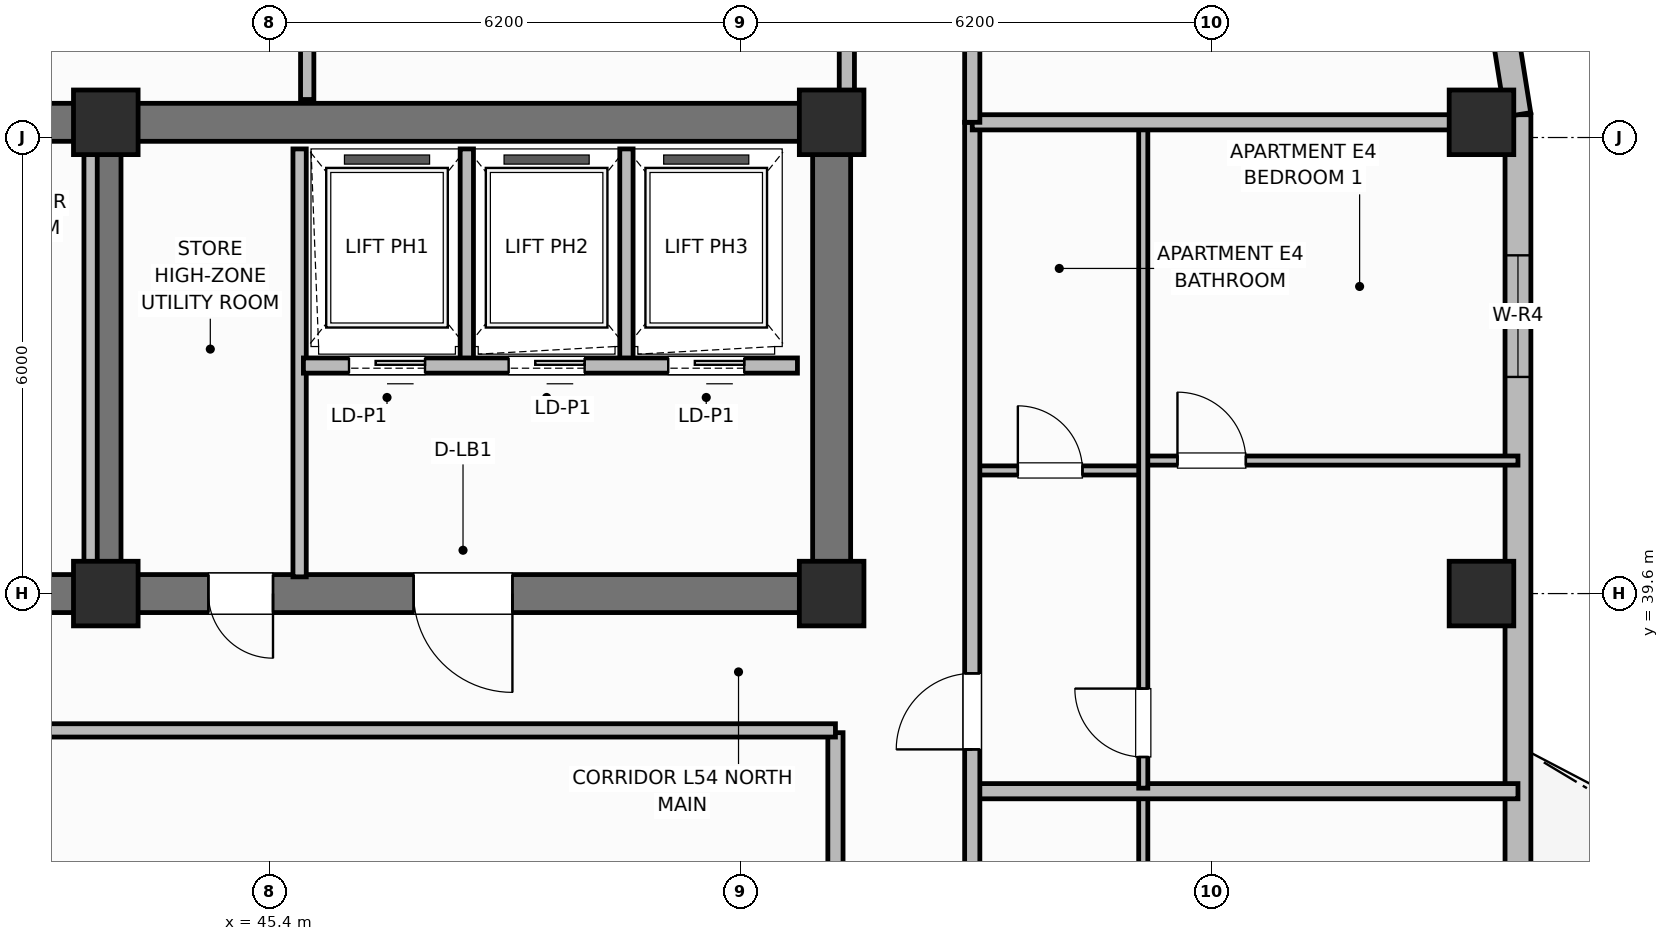
"""IFC4 building model, lengths in metres.
Left out: names, types, materials, properties, quantities, classifications, styles, units other than length and angle.
Written with IfcOpenShell. Run it as: python <this file> out.ifc"""

import sys

from ifc_helpers import new_model, si_unit, direction, frame, frame_2d, origin, origin_2d, place, context, subcontext, project, spatial, rectangle, extrude, element, fill, save


model = new_model("IFC4")
c1 = context("Model", 3, precision=1e-05, world=origin(), true_north=direction((0.0, 1.0)))
c2 = subcontext(c1, "Body", "Model", "MODEL_VIEW")
j1 = project(units=[si_unit("LENGTHUNIT", "METRE"), si_unit("PLANEANGLEUNIT", "RADIAN")], contexts=[c1])
p1 = place(None, origin())
s1 = spatial("IfcSite", under=j1, at=p1, CompositionType="ELEMENT")
p2 = place(p1, origin())
s2 = spatial("IfcBuilding", under=s1, at=p2, CompositionType="ELEMENT")
p3 = place(p2, frame((0.0, 0.0, 218.4)))
s3 = spatial("IfcBuildingStorey", under=s2, at=p3, CompositionType="ELEMENT", Elevation=218.4)
p4 = place(p3, frame((25.6, 45.8, 0.0), z_axis=(0.0, 0.0, 1.0), x_axis=(1.0, 0.0, 0.0)))
e1 = element("IfcWall", 1, at=p4, inside=s3, PredefinedType="SHEAR", context=c2, shape_type="SweptSolid", body=[
    extrude(rectangle(XDim=27.2, YDim=0.5, at=frame_2d((13.6, 0.0))), origin(), (0.0, 0.0, 1.0), 3.7),
])
p5 = place(p3, frame((52.8, 39.85, 0.0), z_axis=(0.0, 0.0, 1.0), x_axis=(0.0, 1.0, 0.0)))
e2 = element("IfcWall", 2, at=p5, inside=s3, PredefinedType="SHEAR", context=c2, shape_type="SweptSolid", body=[
    extrude(rectangle(XDim=5.7, YDim=0.5, at=frame_2d((2.85, 0.0))), origin(), (0.0, 0.0, 1.0), 3.7),
])
p6 = place(p3, frame((52.8, 39.6, 0.0), z_axis=(0.0, 0.0, 1.0), x_axis=(-1.0, 0.0, 0.0)))
e3 = element("IfcWall", 3, at=p6, inside=s3, PredefinedType="SHEAR", context=c2, shape_type="SweptSolid", body=[
    extrude(rectangle(XDim=27.2, YDim=0.5, at=frame_2d((13.6, 0.0))), origin(), (0.0, 0.0, 1.0), 3.7),
])
p7 = place(p6, frame((24.3, 0.0, 0.0)))
e4 = element("IfcOpeningElement", 4, at=p7, cuts=e3, PredefinedType="OPENING", context=c2, shape_type="SweptSolid", body=[
    extrude(rectangle(XDim=1.1, YDim=2.15, at=frame_2d((0.55, 1.075))), frame((0.0, 0.26, 0.0), z_axis=(0.0, -1.0, 0.0), x_axis=(1.0, 0.0, 0.0)), (0.0, 0.0, 1.0), 0.52),
])
p8 = place(p6, frame((21.85, 0.0, 0.0)))
e5 = element("IfcOpeningElement", 5, at=p8, cuts=e3, PredefinedType="OPENING", context=c2, shape_type="SweptSolid", body=[
    extrude(rectangle(XDim=0.85, YDim=2.1, at=frame_2d((0.425, 1.05))), frame((0.0, 0.26, 0.0), z_axis=(0.0, -1.0, 0.0), x_axis=(1.0, 0.0, 0.0)), (0.0, 0.0, 1.0), 0.52),
])
p9 = place(p6, frame((19.85, 0.0, 0.0)))
e6 = element("IfcOpeningElement", 6, at=p9, cuts=e3, PredefinedType="OPENING", context=c2, shape_type="SweptSolid", body=[
    extrude(rectangle(XDim=0.85, YDim=2.1, at=frame_2d((0.425, 1.05))), frame((0.0, 0.26, 0.0), z_axis=(0.0, -1.0, 0.0), x_axis=(1.0, 0.0, 0.0)), (0.0, 0.0, 1.0), 0.52),
])
p10 = place(p6, frame((15.1, 0.0, 0.0)))
e7 = element("IfcOpeningElement", 7, at=p10, cuts=e3, PredefinedType="OPENING", context=c2, shape_type="SweptSolid", body=[
    extrude(rectangle(XDim=1.2, YDim=2.15, at=frame_2d((0.6, 1.075))), frame((0.0, 0.26, 0.0), z_axis=(0.0, -1.0, 0.0), x_axis=(1.0, 0.0, 0.0)), (0.0, 0.0, 1.0), 0.52),
])
p11 = place(p6, frame((12.6, 0.0, 0.0)))
e8 = element("IfcOpeningElement", 8, at=p11, cuts=e3, PredefinedType="OPENING", context=c2, shape_type="SweptSolid", body=[
    extrude(rectangle(XDim=0.85, YDim=2.1, at=frame_2d((0.425, 1.05))), frame((0.0, 0.26, 0.0), z_axis=(0.0, -1.0, 0.0), x_axis=(1.0, 0.0, 0.0)), (0.0, 0.0, 1.0), 0.52),
])
p12 = place(p6, frame((10.85, 0.0, 0.0)))
e9 = element("IfcOpeningElement", 9, at=p12, cuts=e3, PredefinedType="OPENING", context=c2, shape_type="SweptSolid", body=[
    extrude(rectangle(XDim=0.85, YDim=2.1, at=frame_2d((0.425, 1.05))), frame((0.0, 0.26, 0.0), z_axis=(0.0, -1.0, 0.0), x_axis=(1.0, 0.0, 0.0)), (0.0, 0.0, 1.0), 0.52),
])
p13 = place(p6, frame((7.35, 0.0, 0.0)))
e10 = element("IfcOpeningElement", 10, at=p13, cuts=e3, PredefinedType="OPENING", context=c2, shape_type="SweptSolid", body=[
    extrude(rectangle(XDim=0.85, YDim=2.1, at=frame_2d((0.425, 1.05))), frame((0.0, 0.26, 0.0), z_axis=(0.0, -1.0, 0.0), x_axis=(1.0, 0.0, 0.0)), (0.0, 0.0, 1.0), 0.52),
])
p14 = place(p6, frame((4.2, 0.0, 0.0)))
e11 = element("IfcOpeningElement", 11, at=p14, cuts=e3, PredefinedType="OPENING", context=c2, shape_type="SweptSolid", body=[
    extrude(rectangle(XDim=1.3, YDim=2.2, at=frame_2d((0.65, 1.1))), frame((0.0, 0.26, 0.0), z_axis=(0.0, -1.0, 0.0), x_axis=(1.0, 0.0, 0.0)), (0.0, 0.0, 1.0), 0.52),
])
p15 = place(p3, frame((43.25, 39.85, 0.0), z_axis=(0.0, 0.0, 1.0), x_axis=(0.0, 1.0, 0.0)))
e12 = element("IfcWall", 12, at=p15, inside=s3, PredefinedType="SHEAR", context=c2, shape_type="SweptSolid", body=[
    extrude(rectangle(XDim=5.7, YDim=0.4, at=frame_2d((2.85, 0.0))), origin(), (0.0, 0.0, 1.0), 3.7),
])
for number, where, z_axis, x_axis in (
    (13, (43.25, 39.6, 0.0), (0.0, 0.0, 1.0), (1.0, 0.0, 0.0)),
    (14, (43.25, 45.8, 0.0), (0.0, 0.0, 1.0), (1.0, 0.0, 0.0)),
    (15, (52.8, 39.6, 0.0), (0.0, 0.0, 1.0), (1.0, 0.0, 0.0)),
    (16, (52.8, 45.8, 0.0), (0.0, 0.0, 1.0), (1.0, 0.0, 0.0)),
    (17, (61.35, 39.6, 0.0), (0.0, 0.0, 1.0), (1.0, 0.0, 0.0)),
    (18, (61.35, 45.8, 0.0), (0.0, 0.0, 1.0), (1.0, 0.0, 0.0)),
):
    element("IfcColumn", number, at=place(p3, frame(where, z_axis=z_axis, x_axis=x_axis)), inside=s3, PredefinedType="COLUMN", context=c2, shape_type="SweptSolid", body=[
        extrude(rectangle(XDim=0.85, YDim=0.85, at=origin_2d()), origin(), (0.0, 0.0, 1.0), 3.7),
    ])
p16 = place(p3, frame((61.83, 32.6, 0.0), z_axis=(0.0, 0.0, 1.0), x_axis=(0.0, 1.0, 0.0)))
e19 = element("IfcWall", 19, at=p16, inside=s3, PredefinedType="SOLIDWALL", context=c2, shape_type="SweptSolid", body=[
    extrude(rectangle(XDim=13.3, YDim=0.34, at=frame_2d((6.65, 0.0))), origin(), (0.0, 0.0, 1.0), 2.72),
])
p17 = place(p16, frame((1.7, 0.0, 0.0)))
e20 = element("IfcOpeningElement", 20, at=p17, cuts=e19, PredefinedType="OPENING", context=c2, shape_type="SweptSolid", body=[
    extrude(rectangle(XDim=1.6, YDim=2.1, at=frame_2d((0.8, 1.05))), frame((0.0, 0.18, 0.0), z_axis=(0.0, -1.0, 0.0), x_axis=(1.0, 0.0, 0.0)), (0.0, 0.0, 1.0), 0.36),
])
p18 = place(p16, frame((9.85, 0.0, 0.7)))
e21 = element("IfcOpeningElement", 21, at=p18, cuts=e19, PredefinedType="OPENING", context=c2, shape_type="SweptSolid", body=[
    extrude(rectangle(XDim=1.6, YDim=1.9, at=frame_2d((0.8, 0.95))), frame((0.0, 0.18, 0.0), z_axis=(0.0, -1.0, 0.0), x_axis=(1.0, 0.0, 0.0)), (0.0, 0.0, 1.0), 0.36),
])
p19 = place(p3, frame((61.83, 45.9, 0.0), z_axis=(0.0, 0.0, 1.0), x_axis=(-0.156481329164, 0.987680916907, 0.0)))
e22 = element("IfcWall", 22, at=p19, inside=s3, PredefinedType="SOLIDWALL", context=c2, shape_type="SweptSolid", body=[
    extrude(rectangle(XDim=1.136, YDim=0.34, at=frame_2d((0.568, 0.0))), origin(), (0.0, 0.0, 1.0), 2.72),
])
for number, where, z_axis, x_axis in (
    (23, (43.05, 39.82, 0.0), (0.0, 0.0, 1.0), (0.0, 1.0, 0.0)),
    (24, (45.8, 39.82, 0.0), (0.0, 0.0, 1.0), (0.0, 1.0, 0.0)),
):
    element("IfcWall", number, at=place(p3, frame(where, z_axis=z_axis, x_axis=x_axis)), inside=s3, PredefinedType="PARTITIONING", context=c2, shape_type="SweptSolid", body=[
        extrude(rectangle(XDim=5.63, YDim=0.175, at=frame_2d((2.815, 0.0))), origin(), (0.0, 0.0, 1.0), 2.55),
    ])
for number, where, z_axis, x_axis in (
    (25, (48.0, 42.65, 0.0), (0.0, 0.0, 1.0), (0.0, 1.0, 0.0)),
    (26, (50.1, 42.65, 0.0), (0.0, 0.0, 1.0), (0.0, 1.0, 0.0)),
):
    element("IfcWall", number, at=place(p3, frame(where, z_axis=z_axis, x_axis=x_axis)), inside=s3, PredefinedType="PARTITIONING", context=c2, shape_type="SweptSolid", body=[
        extrude(rectangle(XDim=2.8, YDim=0.175, at=frame_2d((1.4, 0.0))), origin(), (0.0, 0.0, 1.0), 2.55),
    ])
p20 = place(p3, frame((52.35, 42.6, 0.0), z_axis=(0.0, 0.0, 1.0), x_axis=(-1.0, 0.0, 0.0)))
e27 = element("IfcWall", 27, at=p20, inside=s3, PredefinedType="PARTITIONING", context=c2, shape_type="SweptSolid", body=[
    extrude(rectangle(XDim=6.5, YDim=0.2, at=frame_2d((3.25, 0.0))), origin(), (0.0, 0.0, 1.0), 2.55),
])
p21 = place(p20, frame((4.9, 0.0, 0.0)))
e28 = element("IfcOpeningElement", 28, at=p21, cuts=e27, PredefinedType="OPENING", context=c2, shape_type="SweptSolid", body=[
    extrude(rectangle(XDim=1.0, YDim=2.15, at=frame_2d((0.5, 1.075))), frame((0.0, 0.11, 0.0), z_axis=(0.0, -1.0, 0.0), x_axis=(1.0, 0.0, 0.0)), (0.0, 0.0, 1.0), 0.22),
])
p22 = place(p20, frame((2.8, 0.0, 0.0)))
e29 = element("IfcOpeningElement", 29, at=p22, cuts=e27, PredefinedType="OPENING", context=c2, shape_type="SweptSolid", body=[
    extrude(rectangle(XDim=1.0, YDim=2.15, at=frame_2d((0.5, 1.075))), frame((0.0, 0.11, 0.0), z_axis=(0.0, -1.0, 0.0), x_axis=(1.0, 0.0, 0.0)), (0.0, 0.0, 1.0), 0.22),
])
p23 = place(p20, frame((0.7, 0.0, 0.0)))
e30 = element("IfcOpeningElement", 30, at=p23, cuts=e27, PredefinedType="OPENING", context=c2, shape_type="SweptSolid", body=[
    extrude(rectangle(XDim=1.0, YDim=2.15, at=frame_2d((0.5, 1.075))), frame((0.0, 0.11, 0.0), z_axis=(0.0, -1.0, 0.0), x_axis=(1.0, 0.0, 0.0)), (0.0, 0.0, 1.0), 0.22),
])
p24 = place(p3, frame((52.85, 18.63, 0.0), z_axis=(0.0, 0.0, 1.0), x_axis=(0.0, 1.0, 0.0)))
e31 = element("IfcWall", 31, at=p24, inside=s3, PredefinedType="PARTITIONING", context=c2, shape_type="SweptSolid", body=[
    extrude(rectangle(XDim=19.14, YDim=0.2, at=frame_2d((9.57, 0.0))), origin(), (0.0, 0.0, 1.0), 2.55),
])
p25 = place(p3, frame((31.35, 37.8, 0.0), z_axis=(0.0, 0.0, 1.0), x_axis=(1.0, 0.0, 0.0)))
e32 = element("IfcWall", 32, at=p25, inside=s3, PredefinedType="PARTITIONING", context=c2, shape_type="SweptSolid", body=[
    extrude(rectangle(XDim=21.5, YDim=0.175, at=frame_2d((10.75, 0.0))), origin(), (0.0, 0.0, 1.0), 2.55),
])
p26 = place(p3, frame((56.9, 26.64, 0.0), z_axis=(0.0, 0.0, 1.0), x_axis=(0.0, 1.0, 0.0)))
e33 = element("IfcWall", 33, at=p26, inside=s3, PredefinedType="PARTITIONING", context=c2, shape_type="SweptSolid", body=[
    extrude(rectangle(XDim=10.32, YDim=0.12, at=frame_2d((5.16, 0.0))), origin(), (0.0, 0.0, 1.0), 2.55),
])
p27 = place(p26, frame((2.81, 0.0, 0.0)))
e34 = element("IfcOpeningElement", 34, at=p27, cuts=e33, PredefinedType="OPENING", context=c2, shape_type="SweptSolid", body=[
    extrude(rectangle(XDim=0.9, YDim=2.1, at=frame_2d((0.45, 1.05))), frame((0.0, 0.07, 0.0), z_axis=(0.0, -1.0, 0.0), x_axis=(1.0, 0.0, 0.0)), (0.0, 0.0, 1.0), 0.14),
])
p28 = place(p3, frame((54.65, 37.0, 0.0), z_axis=(0.0, 0.0, 1.0), x_axis=(1.0, 0.0, 0.0)))
e35 = element("IfcWall", 35, at=p28, inside=s3, PredefinedType="PARTITIONING", context=c2, shape_type="SweptSolid", body=[
    extrude(rectangle(XDim=7.18, YDim=0.2, at=frame_2d((3.59, 0.0))), origin(), (0.0, 0.0, 1.0), 2.55),
])
p29 = place(p3, frame((54.65, 41.22, 0.0), z_axis=(0.0, 0.0, 1.0), x_axis=(1.0, 0.0, 0.0)))
e36 = element("IfcWall", 36, at=p29, inside=s3, PredefinedType="PARTITIONING", context=c2, shape_type="SweptSolid", body=[
    extrude(rectangle(XDim=2.25, YDim=0.12, at=frame_2d((1.125, 0.0))), origin(), (0.0, 0.0, 1.0), 2.55),
])
p30 = place(p29, frame((0.6, 0.0, 0.0)))
e37 = element("IfcOpeningElement", 37, at=p30, cuts=e36, PredefinedType="OPENING", context=c2, shape_type="SweptSolid", body=[
    extrude(rectangle(XDim=0.85, YDim=2.1, at=frame_2d((0.425, 1.05))), frame((0.0, 0.07, 0.0), z_axis=(0.0, -1.0, 0.0), x_axis=(1.0, 0.0, 0.0)), (0.0, 0.0, 1.0), 0.14),
])
p31 = place(p3, frame((56.9, 41.35, 0.0), z_axis=(0.0, 0.0, 1.0), x_axis=(1.0, 0.0, 0.0)))
e38 = element("IfcWall", 38, at=p31, inside=s3, PredefinedType="PARTITIONING", context=c2, shape_type="SweptSolid", body=[
    extrude(rectangle(XDim=4.93, YDim=0.12, at=frame_2d((2.465, 0.0))), origin(), (0.0, 0.0, 1.0), 2.55),
])
p32 = place(p31, frame((0.45, 0.0, 0.0)))
e39 = element("IfcOpeningElement", 39, at=p32, cuts=e38, PredefinedType="OPENING", context=c2, shape_type="SweptSolid", body=[
    extrude(rectangle(XDim=0.9, YDim=2.1, at=frame_2d((0.45, 1.05))), frame((0.0, 0.07, 0.0), z_axis=(0.0, -1.0, 0.0), x_axis=(1.0, 0.0, 0.0)), (0.0, 0.0, 1.0), 0.14),
])
p33 = place(p3, frame((56.9, 37.04, 0.0), z_axis=(0.0, 0.0, 1.0), x_axis=(0.0, 1.0, 0.0)))
e40 = element("IfcWall", 40, at=p33, inside=s3, PredefinedType="PARTITIONING", context=c2, shape_type="SweptSolid", body=[
    extrude(rectangle(XDim=8.72, YDim=0.12, at=frame_2d((4.36, 0.0))), origin(), (0.0, 0.0, 1.0), 2.55),
])
p34 = place(p33, frame((0.41, 0.0, 0.0)))
e41 = element("IfcOpeningElement", 41, at=p34, cuts=e40, PredefinedType="OPENING", context=c2, shape_type="SweptSolid", body=[
    extrude(rectangle(XDim=0.9, YDim=2.1, at=frame_2d((0.45, 1.05))), frame((0.0, 0.07, 0.0), z_axis=(0.0, -1.0, 0.0), x_axis=(1.0, 0.0, 0.0)), (0.0, 0.0, 1.0), 0.14),
])
p35 = place(p3, frame((54.65, 10.6, 0.0), z_axis=(0.0, 0.0, 1.0), x_axis=(0.0, 1.0, 0.0)))
e42 = element("IfcWall", 42, at=p35, inside=s3, PredefinedType="PARTITIONING", context=c2, shape_type="SweptSolid", body=[
    extrude(rectangle(XDim=35.2, YDim=0.2, at=frame_2d((17.6, 0.0))), origin(), (0.0, 0.0, 1.0), 2.55),
])
p36 = place(p35, frame((2.65, 0.0, 0.0)))
e43 = element("IfcOpeningElement", 43, at=p36, cuts=e42, PredefinedType="OPENING", context=c2, shape_type="SweptSolid", body=[
    extrude(rectangle(XDim=1.0, YDim=2.15, at=frame_2d((0.5, 1.075))), frame((0.0, 0.11, 0.0), z_axis=(0.0, -1.0, 0.0), x_axis=(1.0, 0.0, 0.0)), (0.0, 0.0, 1.0), 0.22),
])
p37 = place(p35, frame((10.81, 0.0, 0.0)))
e44 = element("IfcOpeningElement", 44, at=p37, cuts=e42, PredefinedType="OPENING", context=c2, shape_type="SweptSolid", body=[
    extrude(rectangle(XDim=1.0, YDim=2.15, at=frame_2d((0.5, 1.075))), frame((0.0, 0.11, 0.0), z_axis=(0.0, -1.0, 0.0), x_axis=(1.0, 0.0, 0.0)), (0.0, 0.0, 1.0), 0.22),
])
p38 = place(p35, frame((19.54, 0.0, 0.0)))
e45 = element("IfcOpeningElement", 45, at=p38, cuts=e42, PredefinedType="OPENING", context=c2, shape_type="SweptSolid", body=[
    extrude(rectangle(XDim=1.0, YDim=2.15, at=frame_2d((0.5, 1.075))), frame((0.0, 0.11, 0.0), z_axis=(0.0, -1.0, 0.0), x_axis=(1.0, 0.0, 0.0)), (0.0, 0.0, 1.0), 0.22),
])
p39 = place(p35, frame((26.95, 0.0, 0.0)))
e46 = element("IfcOpeningElement", 46, at=p39, cuts=e42, PredefinedType="OPENING", context=c2, shape_type="SweptSolid", body=[
    extrude(rectangle(XDim=1.0, YDim=2.15, at=frame_2d((0.5, 1.075))), frame((0.0, 0.11, 0.0), z_axis=(0.0, -1.0, 0.0), x_axis=(1.0, 0.0, 0.0)), (0.0, 0.0, 1.0), 0.22),
])
p40 = place(p3, frame((54.65, 45.8, 0.0), z_axis=(0.0, 0.0, 1.0), x_axis=(1.0, 0.0, 0.0)))
e47 = element("IfcWall", 47, at=p40, inside=s3, PredefinedType="PARTITIONING", context=c2, shape_type="SweptSolid", body=[
    extrude(rectangle(XDim=6.76, YDim=0.2, at=frame_2d((3.38, 0.0))), origin(), (0.0, 0.0, 1.0), 2.55),
])
p41 = place(p3, frame((54.65, 45.8, 0.0), z_axis=(0.0, 0.0, 1.0), x_axis=(0.0, 1.0, 0.0)))
e48 = element("IfcWall", 48, at=p41, inside=s3, PredefinedType="PARTITIONING", context=c2, shape_type="SweptSolid", body=[
    extrude(rectangle(XDim=3.73, YDim=0.2, at=frame_2d((1.865, 0.0))), origin(), (0.0, 0.0, 1.0), 2.55),
])
p42 = place(p3, frame((45.9, 46.1, 0.0), z_axis=(0.0, 0.0, 1.0), x_axis=(0.0, 1.0, 0.0)))
e49 = element("IfcWall", 49, at=p42, inside=s3, PredefinedType="PARTITIONING", context=c2, shape_type="SweptSolid", body=[
    extrude(rectangle(XDim=3.43, YDim=0.175, at=frame_2d((1.715, 0.0))), origin(), (0.0, 0.0, 1.0), 2.55),
])
p43 = place(p3, frame((53.0, 46.1, 0.0), z_axis=(0.0, 0.0, 1.0), x_axis=(0.0, 1.0, 0.0)))
e50 = element("IfcWall", 50, at=p43, inside=s3, PredefinedType="PARTITIONING", context=c2, shape_type="SweptSolid", body=[
    extrude(rectangle(XDim=2.38, YDim=0.2, at=frame_2d((1.19, 0.0))), origin(), (0.0, 0.0, 1.0), 2.55),
])
p44 = place(p43, frame((0.65, 0.0, 0.0)))
e51 = element("IfcOpeningElement", 51, at=p44, cuts=e50, PredefinedType="OPENING", context=c2, shape_type="SweptSolid", body=[
    extrude(rectangle(XDim=0.9, YDim=2.1, at=frame_2d((0.45, 1.05))), frame((0.0, 0.11, 0.0), z_axis=(0.0, -1.0, 0.0), x_axis=(1.0, 0.0, 0.0)), (0.0, 0.0, 1.0), 0.22),
])
p45 = place(p18, origin())
e52 = element("IfcWindow", 52, at=p45, inside=s3, PartitioningType="SINGLE_PANEL", PredefinedType="WINDOW", context=c2, shape_type="SweptSolid", body=[
    extrude(rectangle(XDim=1.6, YDim=1.9, at=frame_2d((0.8, 0.95))), frame((0.0, 0.03, 0.0), z_axis=(0.0, -1.0, 0.0), x_axis=(1.0, 0.0, 0.0)), (0.0, 0.0, 1.0), 0.06),
])
fill(e21, e52)
p46 = place(p21, origin())
e53 = element("IfcDoor", 53, at=p46, inside=s3, OperationType="SLIDING_TO_LEFT", PredefinedType="DOOR", context=c2, shape_type="SweptSolid", body=[
    extrude(rectangle(XDim=1.0, YDim=2.15, at=frame_2d((0.5, 1.075))), frame((0.0, 0.025, 0.0), z_axis=(0.0, -1.0, 0.0), x_axis=(1.0, 0.0, 0.0)), (0.0, 0.0, 1.0), 0.05),
])
fill(e28, e53)
p47 = place(p22, origin())
e54 = element("IfcDoor", 54, at=p47, inside=s3, OperationType="SLIDING_TO_LEFT", PredefinedType="DOOR", context=c2, shape_type="SweptSolid", body=[
    extrude(rectangle(XDim=1.0, YDim=2.15, at=frame_2d((0.5, 1.075))), frame((0.0, 0.025, 0.0), z_axis=(0.0, -1.0, 0.0), x_axis=(1.0, 0.0, 0.0)), (0.0, 0.0, 1.0), 0.05),
])
fill(e29, e54)
p48 = place(p23, origin())
e55 = element("IfcDoor", 55, at=p48, inside=s3, OperationType="SLIDING_TO_LEFT", PredefinedType="DOOR", context=c2, shape_type="SweptSolid", body=[
    extrude(rectangle(XDim=1.0, YDim=2.15, at=frame_2d((0.5, 1.075))), frame((0.0, 0.025, 0.0), z_axis=(0.0, -1.0, 0.0), x_axis=(1.0, 0.0, 0.0)), (0.0, 0.0, 1.0), 0.05),
])
fill(e30, e55)
p49 = place(p30, origin())
e56 = element("IfcDoor", 56, at=p49, inside=s3, OperationType="SINGLE_SWING_LEFT", PredefinedType="DOOR", context=c2, shape_type="SweptSolid", body=[
    extrude(rectangle(XDim=0.85, YDim=2.1, at=frame_2d((0.425, 1.05))), frame((0.0, 0.025, 0.0), z_axis=(0.0, -1.0, 0.0), x_axis=(1.0, 0.0, 0.0)), (0.0, 0.0, 1.0), 0.05),
])
fill(e37, e56)
p50 = place(p32, origin())
e57 = element("IfcDoor", 57, at=p50, inside=s3, OperationType="SINGLE_SWING_LEFT", PredefinedType="DOOR", context=c2, shape_type="SweptSolid", body=[
    extrude(rectangle(XDim=0.9, YDim=2.1, at=frame_2d((0.45, 1.05))), frame((0.0, 0.025, 0.0), z_axis=(0.0, -1.0, 0.0), x_axis=(1.0, 0.0, 0.0)), (0.0, 0.0, 1.0), 0.05),
])
fill(e39, e57)
p51 = place(p34, origin())
e58 = element("IfcDoor", 58, at=p51, inside=s3, OperationType="SINGLE_SWING_RIGHT", PredefinedType="DOOR", context=c2, shape_type="SweptSolid", body=[
    extrude(rectangle(XDim=0.9, YDim=2.1, at=frame_2d((0.45, 1.05))), frame((0.0, 0.025, 0.0), z_axis=(0.0, -1.0, 0.0), x_axis=(1.0, 0.0, 0.0)), (0.0, 0.0, 1.0), 0.05),
])
fill(e41, e58)
p52 = place(p39, origin())
e59 = element("IfcDoor", 59, at=p52, inside=s3, OperationType="SINGLE_SWING_LEFT", PredefinedType="DOOR", context=c2, shape_type="SweptSolid", body=[
    extrude(rectangle(XDim=1.0, YDim=2.15, at=frame_2d((0.5, 1.075))), frame((0.0, 0.025, 0.0), z_axis=(0.0, -1.0, 0.0), x_axis=(1.0, 0.0, 0.0)), (0.0, 0.0, 1.0), 0.05),
])
fill(e46, e59)
p53 = place(p13, origin())
e60 = element("IfcDoor", 60, at=p53, inside=s3, OperationType="SINGLE_SWING_LEFT", PredefinedType="DOOR", context=c2, shape_type="SweptSolid", body=[
    extrude(rectangle(XDim=0.85, YDim=2.1, at=frame_2d((0.425, 1.05))), frame((0.0, 0.025, 0.0), z_axis=(0.0, -1.0, 0.0), x_axis=(1.0, 0.0, 0.0)), (0.0, 0.0, 1.0), 0.05),
])
fill(e10, e60)
p54 = place(p14, origin())
e61 = element("IfcDoor", 61, at=p54, inside=s3, OperationType="SINGLE_SWING_LEFT", PredefinedType="DOOR", context=c2, shape_type="SweptSolid", body=[
    extrude(rectangle(XDim=1.3, YDim=2.2, at=frame_2d((0.65, 1.1))), frame((0.0, 0.025, 0.0), z_axis=(0.0, -1.0, 0.0), x_axis=(1.0, 0.0, 0.0)), (0.0, 0.0, 1.0), 0.05),
])
fill(e11, e61)
save(model, sys.argv[1])
